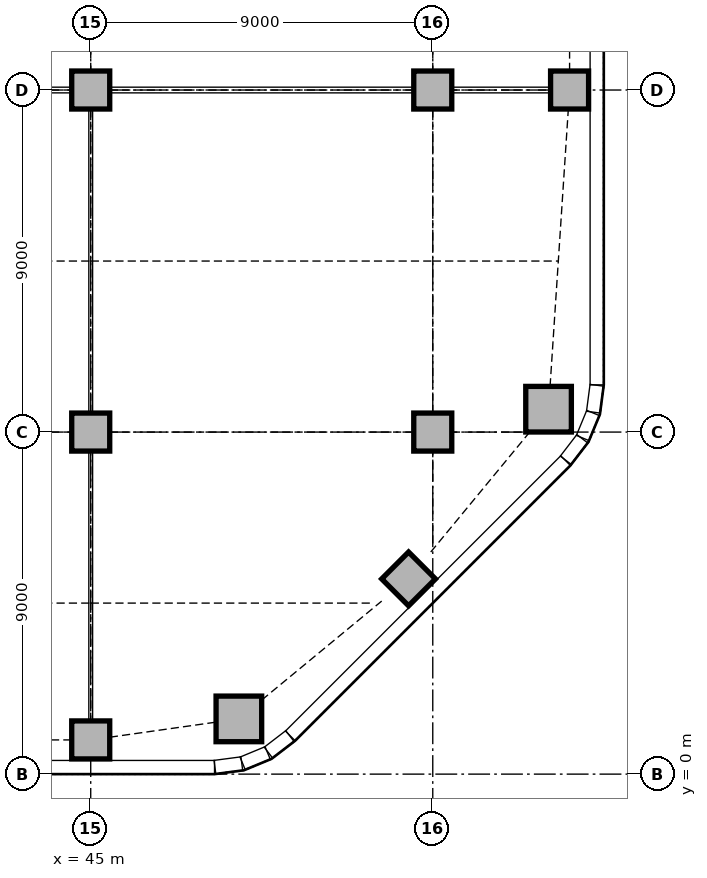
"""IFC4 building model, lengths in metres.
Left out: names, types, materials, properties, quantities, classifications, styles, units other than length and angle.
Written with IfcOpenShell. Run it as: python <this file> out.ifc"""

import sys

from ifc_helpers import new_model, si_unit, direction, frame, frame_2d, origin, origin_2d, place, context, subcontext, project, spatial, rectangle, extrude, element, fill, save


model = new_model("IFC4")
c1 = context("Model", 3, precision=1e-05, world=origin(), true_north=direction((0.0, 1.0)))
c2 = subcontext(c1, "Body", "Model", "MODEL_VIEW")
j1 = project(units=[si_unit("LENGTHUNIT", "METRE"), si_unit("PLANEANGLEUNIT", "RADIAN")], contexts=[c1])
p1 = place(None, origin())
s1 = spatial("IfcSite", under=j1, at=p1, CompositionType="ELEMENT")
p2 = place(p1, origin())
s2 = spatial("IfcBuilding", under=s1, at=p2, CompositionType="ELEMENT")
p3 = place(p2, frame((0.0, 0.0, 26.0)))
s3 = spatial("IfcBuildingStorey", under=s2, at=p3, CompositionType="ELEMENT", Elevation=26.0)
for number, where, z_axis, x_axis in (
    (1, (48.898, 1.453, 0.0), (0.0, 0.0, 1.0), (1.0, 0.0, 0.0)),
    (2, (57.047, 9.602, 0.0), (0.0, 0.0, 1.0), (1.0, 0.0, 0.0)),
):
    element("IfcColumn", number, at=place(p3, frame(where, z_axis=z_axis, x_axis=x_axis)), inside=s3, PredefinedType="COLUMN", context=c2, shape_type="SweptSolid", body=[
        extrude(rectangle(XDim=1.2, YDim=1.2, at=origin_2d()), origin(), (0.0, 0.0, 1.0), 3.85),
    ])
for number, where, z_axis, x_axis in (
    (3, (45.0, 0.9, 0.0), (0.0, 0.0, 1.0), (1.0, 0.0, 0.0)),
    (4, (53.364, 5.136, 0.0), (0.0, 0.0, 1.0), (0.707, 0.707, 0.0)),
    (5, (57.6, 18.0, 0.0), (0.0, 0.0, 1.0), (1.0, 0.0, 0.0)),
    (6, (45.0, 9.0, 0.0), (0.0, 0.0, 1.0), (1.0, 0.0, 0.0)),
    (7, (45.0, 18.0, 0.0), (0.0, 0.0, 1.0), (1.0, 0.0, 0.0)),
    (8, (54.0, 9.0, 0.0), (0.0, 0.0, 1.0), (1.0, 0.0, 0.0)),
    (9, (54.0, 18.0, 0.0), (0.0, 0.0, 1.0), (1.0, 0.0, 0.0)),
):
    element("IfcColumn", number, at=place(p3, frame(where, z_axis=z_axis, x_axis=x_axis)), inside=s3, PredefinedType="COLUMN", context=c2, shape_type="SweptSolid", body=[
        extrude(rectangle(XDim=1.0, YDim=1.0, at=origin_2d()), origin(), (0.0, 0.0, 1.0), 3.85),
    ])
p4 = place(p3, frame((4.243, 0.18, 0.0), z_axis=(0.0, 0.0, 1.0), x_axis=(1.0, 0.0, 0.0)))
e10 = element("IfcWall", 10, at=p4, inside=s3, PredefinedType="STANDARD", context=c2, shape_type="SweptSolid", body=[
    extrude(rectangle(XDim=44.015, YDim=0.36, at=frame_2d((22.007, 0.0))), origin(), (0.0, 0.0, 1.0), 3.85),
])
p5 = place(p4, frame((2.707, 0.0, 0.9)))
e11 = element("IfcOpeningElement", 11, at=p5, cuts=e10, PredefinedType="OPENING", context=c2, shape_type="SweptSolid", body=[
    extrude(rectangle(XDim=3.3, YDim=1.6, at=frame_2d((1.65, 0.8))), frame((0.0, 0.19, 0.0), z_axis=(0.0, -1.0, 0.0), x_axis=(1.0, 0.0, 0.0)), (0.0, 0.0, 1.0), 0.38),
])
p6 = place(p4, frame((7.157, 0.0, 0.0)))
e12 = element("IfcOpeningElement", 12, at=p6, cuts=e10, PredefinedType="OPENING", context=c2, shape_type="SweptSolid", body=[
    extrude(rectangle(XDim=1.8, YDim=2.4, at=frame_2d((0.9, 1.2))), frame((0.0, 0.19, 0.0), z_axis=(0.0, -1.0, 0.0), x_axis=(1.0, 0.0, 0.0)), (0.0, 0.0, 1.0), 0.38),
])
p7 = place(p4, frame((11.357, 0.0, 0.9)))
e13 = element("IfcOpeningElement", 13, at=p7, cuts=e10, PredefinedType="OPENING", context=c2, shape_type="SweptSolid", body=[
    extrude(rectangle(XDim=3.3, YDim=1.6, at=frame_2d((1.65, 0.8))), frame((0.0, 0.19, 0.0), z_axis=(0.0, -1.0, 0.0), x_axis=(1.0, 0.0, 0.0)), (0.0, 0.0, 1.0), 0.38),
])
p8 = place(p4, frame((16.307, 0.0, 0.9)))
e14 = element("IfcOpeningElement", 14, at=p8, cuts=e10, PredefinedType="OPENING", context=c2, shape_type="SweptSolid", body=[
    extrude(rectangle(XDim=1.8, YDim=1.6, at=frame_2d((0.9, 0.8))), frame((0.0, 0.19, 0.0), z_axis=(0.0, -1.0, 0.0), x_axis=(1.0, 0.0, 0.0)), (0.0, 0.0, 1.0), 0.38),
])
p9 = place(p4, frame((20.357, 0.0, 0.9)))
e15 = element("IfcOpeningElement", 15, at=p9, cuts=e10, PredefinedType="OPENING", context=c2, shape_type="SweptSolid", body=[
    extrude(rectangle(XDim=3.3, YDim=1.6, at=frame_2d((1.65, 0.8))), frame((0.0, 0.19, 0.0), z_axis=(0.0, -1.0, 0.0), x_axis=(1.0, 0.0, 0.0)), (0.0, 0.0, 1.0), 0.38),
])
p10 = place(p4, frame((25.307, 0.0, 0.9)))
e16 = element("IfcOpeningElement", 16, at=p10, cuts=e10, PredefinedType="OPENING", context=c2, shape_type="SweptSolid", body=[
    extrude(rectangle(XDim=1.8, YDim=1.6, at=frame_2d((0.9, 0.8))), frame((0.0, 0.19, 0.0), z_axis=(0.0, -1.0, 0.0), x_axis=(1.0, 0.0, 0.0)), (0.0, 0.0, 1.0), 0.38),
])
p11 = place(p4, frame((29.357, 0.0, 0.9)))
e17 = element("IfcOpeningElement", 17, at=p11, cuts=e10, PredefinedType="OPENING", context=c2, shape_type="SweptSolid", body=[
    extrude(rectangle(XDim=3.3, YDim=1.6, at=frame_2d((1.65, 0.8))), frame((0.0, 0.19, 0.0), z_axis=(0.0, -1.0, 0.0), x_axis=(1.0, 0.0, 0.0)), (0.0, 0.0, 1.0), 0.38),
])
p12 = place(p4, frame((33.857, 0.0, 0.9)))
e18 = element("IfcOpeningElement", 18, at=p12, cuts=e10, PredefinedType="OPENING", context=c2, shape_type="SweptSolid", body=[
    extrude(rectangle(XDim=3.3, YDim=1.6, at=frame_2d((1.65, 0.8))), frame((0.0, 0.19, 0.0), z_axis=(0.0, -1.0, 0.0), x_axis=(1.0, 0.0, 0.0)), (0.0, 0.0, 1.0), 0.38),
])
p13 = place(p4, frame((38.357, 0.0, 0.9)))
e19 = element("IfcOpeningElement", 19, at=p13, cuts=e10, PredefinedType="OPENING", context=c2, shape_type="SweptSolid", body=[
    extrude(rectangle(XDim=3.3, YDim=1.6, at=frame_2d((1.65, 0.8))), frame((0.0, 0.19, 0.0), z_axis=(0.0, -1.0, 0.0), x_axis=(1.0, 0.0, 0.0)), (0.0, 0.0, 1.0), 0.38),
])
p14 = place(p3, frame((50.251, 1.006, 0.0), z_axis=(0.0, 0.0, 1.0), x_axis=(0.707106781187, 0.707106781187, 0.0)))
e20 = element("IfcWall", 20, at=p14, inside=s3, PredefinedType="STANDARD", context=c2, shape_type="SweptSolid", body=[
    extrude(rectangle(XDim=10.243, YDim=0.36, at=frame_2d((5.121, 0.0))), origin(), (0.0, 0.0, 1.0), 3.85),
])
p15 = place(p14, frame((3.471, 0.0, 0.9)))
e21 = element("IfcOpeningElement", 21, at=p15, cuts=e20, PredefinedType="OPENING", context=c2, shape_type="SweptSolid", body=[
    extrude(rectangle(XDim=3.3, YDim=1.6, at=frame_2d((1.65, 0.8))), frame((0.0, 0.19, 0.0), z_axis=(0.0, -1.0, 0.0), x_axis=(1.0, 0.0, 0.0)), (0.0, 0.0, 1.0), 0.38),
])
p16 = place(p3, frame((58.32, 10.243, 0.0), z_axis=(0.0, 0.0, 1.0), x_axis=(0.0, 1.0, 0.0)))
e22 = element("IfcWall", 22, at=p16, inside=s3, PredefinedType="STANDARD", context=c2, shape_type="SweptSolid", body=[
    extrude(rectangle(XDim=24.515, YDim=0.36, at=frame_2d((12.257, 0.0))), origin(), (0.0, 0.0, 1.0), 3.85),
])
p17 = place(p16, frame((4.607, 0.0, 0.0)))
e23 = element("IfcOpeningElement", 23, at=p17, cuts=e22, PredefinedType="OPENING", context=c2, shape_type="SweptSolid", body=[
    extrude(rectangle(XDim=1.8, YDim=2.4, at=frame_2d((0.9, 1.2))), frame((0.0, 0.19, 0.0), z_axis=(0.0, -1.0, 0.0), x_axis=(1.0, 0.0, 0.0)), (0.0, 0.0, 1.0), 0.38),
])
p18 = place(p16, frame((8.757, 0.0, 0.9)))
e24 = element("IfcOpeningElement", 24, at=p18, cuts=e22, PredefinedType="OPENING", context=c2, shape_type="SweptSolid", body=[
    extrude(rectangle(XDim=1.8, YDim=1.6, at=frame_2d((0.9, 0.8))), frame((0.0, 0.19, 0.0), z_axis=(0.0, -1.0, 0.0), x_axis=(1.0, 0.0, 0.0)), (0.0, 0.0, 1.0), 0.38),
])
p19 = place(p16, frame((12.557, 0.0, 0.9)))
e25 = element("IfcOpeningElement", 25, at=p19, cuts=e22, PredefinedType="OPENING", context=c2, shape_type="SweptSolid", body=[
    extrude(rectangle(XDim=3.3, YDim=1.6, at=frame_2d((1.65, 0.8))), frame((0.0, 0.19, 0.0), z_axis=(0.0, -1.0, 0.0), x_axis=(1.0, 0.0, 0.0)), (0.0, 0.0, 1.0), 0.38),
])
p20 = place(p16, frame((17.357, 0.0, 0.9)))
e26 = element("IfcOpeningElement", 26, at=p20, cuts=e22, PredefinedType="OPENING", context=c2, shape_type="SweptSolid", body=[
    extrude(rectangle(XDim=3.3, YDim=1.6, at=frame_2d((1.65, 0.8))), frame((0.0, 0.19, 0.0), z_axis=(0.0, -1.0, 0.0), x_axis=(1.0, 0.0, 0.0)), (0.0, 0.0, 1.0), 0.38),
])
for number, where, z_axis, x_axis in (
    (27, (48.269, 0.183, 0.0), (0.0, 0.0, 1.0), (0.991, 0.131, 0.0)),
    (28, (48.997, 0.282, 0.0), (0.0, 0.0, 1.0), (0.924, 0.383, 0.0)),
):
    element("IfcWall", number, at=place(p3, frame(where, z_axis=z_axis, x_axis=x_axis)), inside=s3, PredefinedType="STANDARD", context=c2, shape_type="SweptSolid", body=[
        extrude(rectangle(XDim=0.713, YDim=0.36, at=frame_2d((0.356, 0.0))), origin(), (0.0, 0.0, 1.0), 3.85),
    ])
for number, where, z_axis, x_axis in (
    (29, (49.675, 0.566, 0.0), (0.0, 0.0, 1.0), (0.793, 0.609, 0.0)),
    (30, (57.5, 8.259, 0.0), (0.0, 0.0, 1.0), (0.609, 0.793, 0.0)),
):
    element("IfcWall", number, at=place(p3, frame(where, z_axis=z_axis, x_axis=x_axis)), inside=s3, PredefinedType="STANDARD", context=c2, shape_type="SweptSolid", body=[
        extrude(rectangle(XDim=0.713, YDim=0.36, at=frame_2d((0.357, 0.0))), origin(), (0.0, 0.0, 1.0), 3.85),
    ])
for number, where, z_axis, x_axis in (
    (31, (57.945, 8.844, 0.0), (0.0, 0.0, 1.0), (0.383, 0.924, 0.0)),
    (32, (58.224, 9.524, 0.0), (0.0, 0.0, 1.0), (0.131, 0.991, 0.0)),
):
    element("IfcWall", number, at=place(p3, frame(where, z_axis=z_axis, x_axis=x_axis)), inside=s3, PredefinedType="STANDARD", context=c2, shape_type="SweptSolid", body=[
        extrude(rectangle(XDim=0.713, YDim=0.36, at=frame_2d((0.356, 0.0))), origin(), (0.0, 0.0, 1.0), 3.85),
    ])
p21 = place(p3, frame((54.5, 18.0, 0.0), z_axis=(0.0, 0.0, 1.0), x_axis=(1.0, 0.0, 0.0)))
e33 = element("IfcWall", 33, at=p21, inside=s3, PredefinedType="PARTITIONING", context=c2, shape_type="SweptSolid", body=[
    extrude(rectangle(XDim=2.6, YDim=0.15, at=frame_2d((1.3, 0.0))), origin(), (0.0, 0.0, 1.0), 3.602),
])
p22 = place(p21, frame((0.85, 0.0, 0.0)))
e34 = element("IfcOpeningElement", 34, at=p22, cuts=e33, PredefinedType="OPENING", context=c2, shape_type="SweptSolid", body=[
    extrude(rectangle(XDim=0.9, YDim=2.1, at=frame_2d((0.45, 1.05))), frame((0.0, 0.085, 0.0), z_axis=(0.0, -1.0, 0.0), x_axis=(1.0, 0.0, 0.0)), (0.0, 0.0, 1.0), 0.17),
])
p23 = place(p3, frame((45.5, 18.0, 0.0), z_axis=(0.0, 0.0, 1.0), x_axis=(1.0, 0.0, 0.0)))
e35 = element("IfcWall", 35, at=p23, inside=s3, PredefinedType="PARTITIONING", context=c2, shape_type="SweptSolid", body=[
    extrude(rectangle(XDim=8.0, YDim=0.15, at=frame_2d((4.0, 0.0))), origin(), (0.0, 0.0, 1.0), 3.15),
])
p24 = place(p3, frame((36.5, 18.0, 0.0), z_axis=(0.0, 0.0, 1.0), x_axis=(1.0, 0.0, 0.0)))
e36 = element("IfcWall", 36, at=p24, inside=s3, PredefinedType="PARTITIONING", context=c2, shape_type="SweptSolid", body=[
    extrude(rectangle(XDim=8.0, YDim=0.15, at=frame_2d((4.0, 0.0))), origin(), (0.0, 0.0, 1.0), 3.15),
])
p25 = place(p24, frame((3.55, 0.0, 0.0)))
e37 = element("IfcOpeningElement", 37, at=p25, cuts=e36, PredefinedType="OPENING", context=c2, shape_type="SweptSolid", body=[
    extrude(rectangle(XDim=0.9, YDim=2.1, at=frame_2d((0.45, 1.05))), frame((0.0, 0.085, 0.0), z_axis=(0.0, -1.0, 0.0), x_axis=(1.0, 0.0, 0.0)), (0.0, 0.0, 1.0), 0.17),
])
p26 = place(p3, frame((45.0, 1.4, 0.0), z_axis=(0.0, 0.0, 1.0), x_axis=(0.0, 1.0, 0.0)))
e38 = element("IfcWall", 38, at=p26, inside=s3, PredefinedType="PARTITIONING", context=c2, shape_type="SweptSolid", body=[
    extrude(rectangle(XDim=7.1, YDim=0.1, at=frame_2d((3.55, 0.0))), origin(), (0.0, 0.0, 1.0), 3.158),
])
p27 = place(p3, frame((45.0, 9.5, 0.0), z_axis=(0.0, 0.0, 1.0), x_axis=(0.0, 1.0, 0.0)))
e39 = element("IfcWall", 39, at=p27, inside=s3, PredefinedType="PARTITIONING", context=c2, shape_type="SweptSolid", body=[
    extrude(rectangle(XDim=8.0, YDim=0.1, at=frame_2d((4.0, 0.0))), origin(), (0.0, 0.0, 1.0), 3.158),
])
p28 = place(p13, origin())
e40 = element("IfcWindow", 40, at=p28, inside=s3, PartitioningType="SINGLE_PANEL", PredefinedType="WINDOW", context=c2, shape_type="SweptSolid", body=[
    extrude(rectangle(XDim=3.3, YDim=1.6, at=frame_2d((1.65, 0.8))), frame((0.0, 0.13, 0.0), z_axis=(0.0, -1.0, 0.0), x_axis=(1.0, 0.0, 0.0)), (0.0, 0.0, 1.0), 0.06),
])
fill(e19, e40)
p29 = place(p15, origin())
e41 = element("IfcWindow", 41, at=p29, inside=s3, PartitioningType="SINGLE_PANEL", PredefinedType="WINDOW", context=c2, shape_type="SweptSolid", body=[
    extrude(rectangle(XDim=3.3, YDim=1.6, at=frame_2d((1.65, 0.8))), frame((0.0, 0.13, 0.0), z_axis=(0.0, -1.0, 0.0), x_axis=(1.0, 0.0, 0.0)), (0.0, 0.0, 1.0), 0.06),
])
fill(e21, e41)
p30 = place(p17, frame((1.8, 0.0, 0.0), z_axis=(0.0, 0.0, 1.0), x_axis=(-1.0, 0.0, 0.0)))
e42 = element("IfcDoor", 42, at=p30, inside=s3, OperationType="DOUBLE_DOOR_SINGLE_SWING", PredefinedType="DOOR", context=c2, shape_type="SweptSolid", body=[
    extrude(rectangle(XDim=1.8, YDim=2.4, at=frame_2d((0.9, 1.2))), frame((0.0, -0.07, 0.0), z_axis=(0.0, -1.0, 0.0), x_axis=(1.0, 0.0, 0.0)), (0.0, 0.0, 1.0), 0.05),
])
fill(e23, e42)
p31 = place(p22, frame((0.9, 0.0, 0.0), z_axis=(0.0, 0.0, 1.0), x_axis=(-1.0, 0.0, 0.0)))
e43 = element("IfcDoor", 43, at=p31, inside=s3, OperationType="SINGLE_SWING_LEFT", PredefinedType="DOOR", context=c2, shape_type="SweptSolid", body=[
    extrude(rectangle(XDim=0.9, YDim=2.1, at=frame_2d((0.45, 1.05))), frame((0.0, 0.025, 0.0), z_axis=(0.0, -1.0, 0.0), x_axis=(1.0, 0.0, 0.0)), (0.0, 0.0, 1.0), 0.05),
])
fill(e34, e43)
save(model, sys.argv[1])
